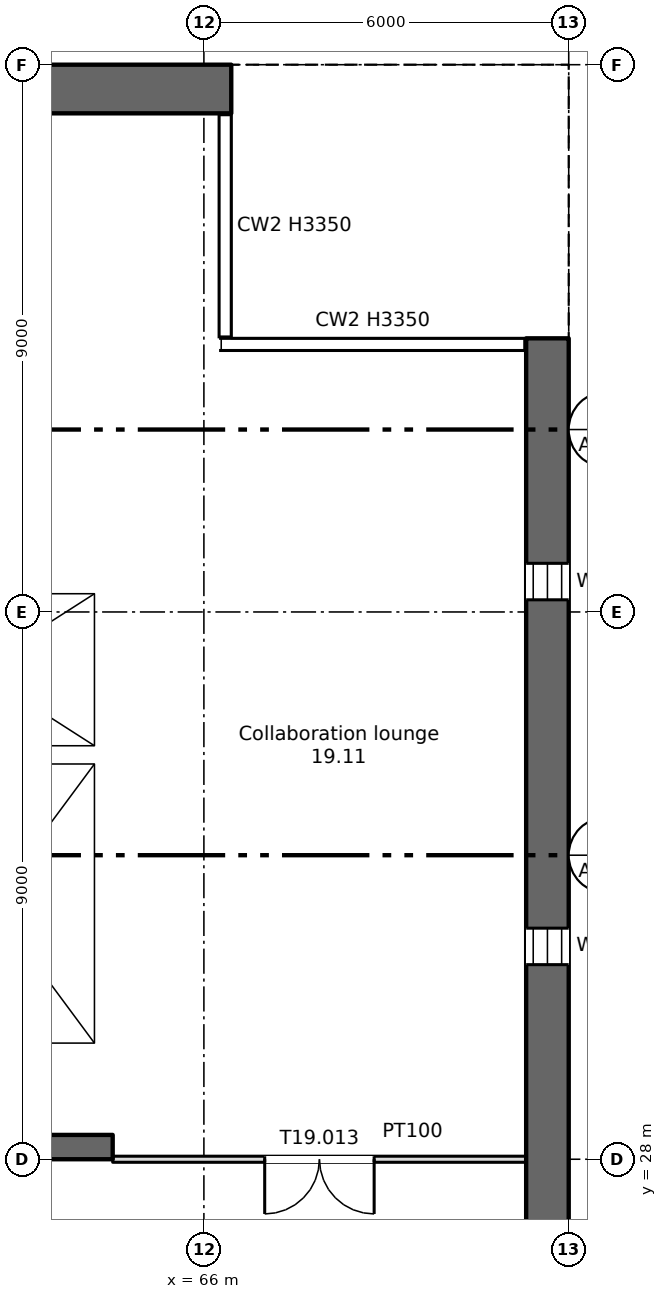
"""IFC4 building model, lengths in metres.
Left out: names, types, materials, properties, quantities, classifications, styles, units other than length and angle.
Written with IfcOpenShell. Run it as: python <this file> out.ifc"""

import sys

from ifc_helpers import new_model, si_unit, direction, frame, frame_2d, origin, place, context, subcontext, project, spatial, rectangle, extrude, element, fill, save


model = new_model("IFC4")
c1 = context("Model", 3, precision=1e-05, world=origin(), true_north=direction((0.0, 1.0)))
c2 = subcontext(c1, "Body", "Model", "MODEL_VIEW")
j1 = project(units=[si_unit("LENGTHUNIT", "METRE"), si_unit("PLANEANGLEUNIT", "RADIAN")], contexts=[c1])
p1 = place(None, origin())
s1 = spatial("IfcSite", under=j1, at=p1, CompositionType="ELEMENT")
p2 = place(p1, origin())
s2 = spatial("IfcBuilding", under=s1, at=p2, CompositionType="ELEMENT")
p3 = place(p2, frame((0.0, 0.0, 125.0)))
s3 = spatial("IfcBuildingStorey", under=s2, at=p3, CompositionType="ELEMENT", Elevation=125.0)
p4 = place(p3, frame((71.65, 6.0, 0.0), z_axis=(0.0, 0.0, 1.0), x_axis=(0.0, 1.0, 0.0)))
e1 = element("IfcWall", 1, at=p4, inside=s3, PredefinedType="SHEAR", context=c2, shape_type="SweptSolid", body=[
    extrude(rectangle(XDim=35.5, YDim=0.7, at=frame_2d((17.75, 0.0))), origin(), (0.0, 0.0, 1.0), 3.35),
])
p5 = place(p4, frame((1.2, 0.0, 0.6)))
e2 = element("IfcOpeningElement", 2, at=p5, cuts=e1, PredefinedType="OPENING", context=c2, shape_type="SweptSolid", body=[
    extrude(rectangle(XDim=0.6, YDim=2.4, at=frame_2d((0.3, 1.2))), frame((0.0, 0.36, 0.0), z_axis=(0.0, -1.0, 0.0), x_axis=(1.0, 0.0, 0.0)), (0.0, 0.0, 1.0), 0.72),
])
p6 = place(p4, frame((7.2, 0.0, 0.6)))
e3 = element("IfcOpeningElement", 3, at=p6, cuts=e1, PredefinedType="OPENING", context=c2, shape_type="SweptSolid", body=[
    extrude(rectangle(XDim=0.6, YDim=2.4, at=frame_2d((0.3, 1.2))), frame((0.0, 0.36, 0.0), z_axis=(0.0, -1.0, 0.0), x_axis=(1.0, 0.0, 0.0)), (0.0, 0.0, 1.0), 0.72),
])
p7 = place(p4, frame((13.2, 0.0, 0.6)))
e4 = element("IfcOpeningElement", 4, at=p7, cuts=e1, PredefinedType="OPENING", context=c2, shape_type="SweptSolid", body=[
    extrude(rectangle(XDim=0.6, YDim=2.4, at=frame_2d((0.3, 1.2))), frame((0.0, 0.36, 0.0), z_axis=(0.0, -1.0, 0.0), x_axis=(1.0, 0.0, 0.0)), (0.0, 0.0, 1.0), 0.72),
])
p8 = place(p4, frame((19.2, 0.0, 0.6)))
e5 = element("IfcOpeningElement", 5, at=p8, cuts=e1, PredefinedType="OPENING", context=c2, shape_type="SweptSolid", body=[
    extrude(rectangle(XDim=0.6, YDim=2.4, at=frame_2d((0.3, 1.2))), frame((0.0, 0.36, 0.0), z_axis=(0.0, -1.0, 0.0), x_axis=(1.0, 0.0, 0.0)), (0.0, 0.0, 1.0), 0.72),
])
p9 = place(p4, frame((25.2, 0.0, 0.6)))
e6 = element("IfcOpeningElement", 6, at=p9, cuts=e1, PredefinedType="OPENING", context=c2, shape_type="SweptSolid", body=[
    extrude(rectangle(XDim=0.6, YDim=2.4, at=frame_2d((0.3, 1.2))), frame((0.0, 0.36, 0.0), z_axis=(0.0, -1.0, 0.0), x_axis=(1.0, 0.0, 0.0)), (0.0, 0.0, 1.0), 0.72),
])
p10 = place(p4, frame((31.2, 0.0, 0.6)))
e7 = element("IfcOpeningElement", 7, at=p10, cuts=e1, PredefinedType="OPENING", context=c2, shape_type="SweptSolid", body=[
    extrude(rectangle(XDim=0.6, YDim=2.4, at=frame_2d((0.3, 1.2))), frame((0.0, 0.36, 0.0), z_axis=(0.0, -1.0, 0.0), x_axis=(1.0, 0.0, 0.0)), (0.0, 0.0, 1.0), 0.72),
])
p11 = place(p3, frame((5.55, 45.6, 0.0), z_axis=(0.0, 0.0, 1.0), x_axis=(1.0, 0.0, 0.0)))
e8 = element("IfcWall", 8, at=p11, inside=s3, PredefinedType="SHEAR", context=c2, shape_type="SweptSolid", body=[
    extrude(rectangle(XDim=60.9, YDim=0.8, at=frame_2d((30.45, 0.0))), origin(), (0.0, 0.0, 1.0), 3.35),
])
p12 = place(p11, frame((7.2, 0.0, 0.6)))
e9 = element("IfcOpeningElement", 9, at=p12, cuts=e8, PredefinedType="OPENING", context=c2, shape_type="SweptSolid", body=[
    extrude(rectangle(XDim=0.6, YDim=2.4, at=frame_2d((0.3, 1.2))), frame((0.0, 0.41, 0.0), z_axis=(0.0, -1.0, 0.0), x_axis=(1.0, 0.0, 0.0)), (0.0, 0.0, 1.0), 0.82),
])
p13 = place(p3, frame((6.7, 28.2, 0.0), z_axis=(0.0, 0.0, 1.0), x_axis=(1.0, 0.0, 0.0)))
e10 = element("IfcWall", 10, at=p13, inside=s3, PredefinedType="SHEAR", context=c2, shape_type="SweptSolid", body=[
    extrude(rectangle(XDim=57.8, YDim=0.4, at=frame_2d((28.9, 0.0))), origin(), (0.0, 0.0, 1.0), 3.35),
])
p14 = place(p13, frame((12.062, 0.0, 0.0)))
e11 = element("IfcOpeningElement", 11, at=p14, cuts=e10, PredefinedType="OPENING", context=c2, shape_type="SweptSolid", body=[
    extrude(rectangle(XDim=0.9, YDim=2.1, at=frame_2d((0.45, 1.05))), frame((0.0, 0.21, 0.0), z_axis=(0.0, -1.0, 0.0), x_axis=(1.0, 0.0, 0.0)), (0.0, 0.0, 1.0), 0.42),
])
p15 = place(p13, frame((14.637, 0.0, 0.0)))
e12 = element("IfcOpeningElement", 12, at=p15, cuts=e10, PredefinedType="OPENING", context=c2, shape_type="SweptSolid", body=[
    extrude(rectangle(XDim=0.9, YDim=2.1, at=frame_2d((0.45, 1.05))), frame((0.0, 0.21, 0.0), z_axis=(0.0, -1.0, 0.0), x_axis=(1.0, 0.0, 0.0)), (0.0, 0.0, 1.0), 0.42),
])
p16 = place(p13, frame((49.062, 0.0, 0.0)))
e13 = element("IfcOpeningElement", 13, at=p16, cuts=e10, PredefinedType="OPENING", context=c2, shape_type="SweptSolid", body=[
    extrude(rectangle(XDim=0.9, YDim=2.1, at=frame_2d((0.45, 1.05))), frame((0.0, 0.21, 0.0), z_axis=(0.0, -1.0, 0.0), x_axis=(1.0, 0.0, 0.0)), (0.0, 0.0, 1.0), 0.42),
])
p17 = place(p13, frame((51.637, 0.0, 0.0)))
e14 = element("IfcOpeningElement", 14, at=p17, cuts=e10, PredefinedType="OPENING", context=c2, shape_type="SweptSolid", body=[
    extrude(rectangle(XDim=0.9, YDim=2.1, at=frame_2d((0.45, 1.05))), frame((0.0, 0.21, 0.0), z_axis=(0.0, -1.0, 0.0), x_axis=(1.0, 0.0, 0.0)), (0.0, 0.0, 1.0), 0.42),
])
p18 = place(p13, frame((1.35, 0.0, 0.0)))
e15 = element("IfcOpeningElement", 15, at=p18, cuts=e10, PredefinedType="OPENING", context=c2, shape_type="SweptSolid", body=[
    extrude(rectangle(XDim=0.9, YDim=2.1, at=frame_2d((0.45, 1.05))), frame((0.0, 0.21, 0.0), z_axis=(0.0, -1.0, 0.0), x_axis=(1.0, 0.0, 0.0)), (0.0, 0.0, 1.0), 0.42),
])
p19 = place(p13, frame((4.7, 0.0, 0.0)))
e16 = element("IfcOpeningElement", 16, at=p19, cuts=e10, PredefinedType="OPENING", context=c2, shape_type="SweptSolid", body=[
    extrude(rectangle(XDim=1.2, YDim=2.1, at=frame_2d((0.6, 1.05))), frame((0.0, 0.21, 0.0), z_axis=(0.0, -1.0, 0.0), x_axis=(1.0, 0.0, 0.0)), (0.0, 0.0, 1.0), 0.42),
])
p20 = place(p13, frame((31.7, 0.0, 0.0)))
e17 = element("IfcOpeningElement", 17, at=p20, cuts=e10, PredefinedType="OPENING", context=c2, shape_type="SweptSolid", body=[
    extrude(rectangle(XDim=1.2, YDim=2.1, at=frame_2d((0.6, 1.05))), frame((0.0, 0.21, 0.0), z_axis=(0.0, -1.0, 0.0), x_axis=(1.0, 0.0, 0.0)), (0.0, 0.0, 1.0), 0.42),
])
p21 = place(p13, frame((55.2, 0.0, 0.0)))
e18 = element("IfcOpeningElement", 18, at=p21, cuts=e10, PredefinedType="OPENING", context=c2, shape_type="SweptSolid", body=[
    extrude(rectangle(XDim=1.2, YDim=2.1, at=frame_2d((0.6, 1.05))), frame((0.0, 0.21, 0.0), z_axis=(0.0, -1.0, 0.0), x_axis=(1.0, 0.0, 0.0)), (0.0, 0.0, 1.0), 0.42),
])
p22 = place(p13, frame((21.7, 0.0, 0.0)))
e19 = element("IfcOpeningElement", 19, at=p22, cuts=e10, PredefinedType="OPENING", context=c2, shape_type="SweptSolid", body=[
    extrude(rectangle(XDim=1.2, YDim=2.1, at=frame_2d((0.6, 1.05))), frame((0.0, 0.21, 0.0), z_axis=(0.0, -1.0, 0.0), x_axis=(1.0, 0.0, 0.0)), (0.0, 0.0, 1.0), 0.42),
])
p23 = place(p13, frame((41.7, 0.0, 0.0)))
e20 = element("IfcOpeningElement", 20, at=p23, cuts=e10, PredefinedType="OPENING", context=c2, shape_type="SweptSolid", body=[
    extrude(rectangle(XDim=1.2, YDim=2.1, at=frame_2d((0.6, 1.05))), frame((0.0, 0.21, 0.0), z_axis=(0.0, -1.0, 0.0), x_axis=(1.0, 0.0, 0.0)), (0.0, 0.0, 1.0), 0.42),
])
p24 = place(p13, frame((24.85, 0.0, 0.0)))
e21 = element("IfcOpeningElement", 21, at=p24, cuts=e10, PredefinedType="OPENING", context=c2, shape_type="SweptSolid", body=[
    extrude(rectangle(XDim=2.4, YDim=2.1, at=frame_2d((1.2, 1.05))), frame((0.0, 0.21, 0.0), z_axis=(0.0, -1.0, 0.0), x_axis=(1.0, 0.0, 0.0)), (0.0, 0.0, 1.0), 0.42),
])
p25 = place(p13, frame((37.35, 0.0, 0.0)))
e22 = element("IfcOpeningElement", 22, at=p25, cuts=e10, PredefinedType="OPENING", context=c2, shape_type="SweptSolid", body=[
    extrude(rectangle(XDim=2.4, YDim=2.1, at=frame_2d((1.2, 1.05))), frame((0.0, 0.21, 0.0), z_axis=(0.0, -1.0, 0.0), x_axis=(1.0, 0.0, 0.0)), (0.0, 0.0, 1.0), 0.42),
])
p26 = place(p13, frame((7.95, 0.0, 0.0)))
e23 = element("IfcOpeningElement", 23, at=p26, cuts=e10, PredefinedType="OPENING", context=c2, shape_type="SweptSolid", body=[
    extrude(rectangle(XDim=2.4, YDim=2.1, at=frame_2d((1.2, 1.05))), frame((0.0, 0.21, 0.0), z_axis=(0.0, -1.0, 0.0), x_axis=(1.0, 0.0, 0.0)), (0.0, 0.0, 1.0), 0.42),
])
p27 = place(p13, frame((28.85, 0.0, 0.0)))
e24 = element("IfcOpeningElement", 24, at=p27, cuts=e10, PredefinedType="OPENING", context=c2, shape_type="SweptSolid", body=[
    extrude(rectangle(XDim=0.9, YDim=2.1, at=frame_2d((0.45, 1.05))), frame((0.0, 0.21, 0.0), z_axis=(0.0, -1.0, 0.0), x_axis=(1.0, 0.0, 0.0)), (0.0, 0.0, 1.0), 0.42),
])
p28 = place(p13, frame((34.85, 0.0, 0.0)))
e25 = element("IfcOpeningElement", 25, at=p28, cuts=e10, PredefinedType="OPENING", context=c2, shape_type="SweptSolid", body=[
    extrude(rectangle(XDim=0.9, YDim=2.1, at=frame_2d((0.45, 1.05))), frame((0.0, 0.21, 0.0), z_axis=(0.0, -1.0, 0.0), x_axis=(1.0, 0.0, 0.0)), (0.0, 0.0, 1.0), 0.42),
])
p29 = place(p3, frame((64.35, 34.8, 0.0), z_axis=(0.0, 0.0, 1.0), x_axis=(0.0, 1.0, 0.0)))
e26 = element("IfcWall", 26, at=p29, inside=s3, PredefinedType="SHEAR", context=c2, shape_type="SweptSolid", body=[
    extrude(rectangle(XDim=10.4, YDim=0.3, at=frame_2d((5.2, 0.0))), origin(), (0.0, 0.0, 1.0), 3.35),
])
p30 = place(p3, frame((64.35, 28.4, 0.0), z_axis=(0.0, 0.0, 1.0), x_axis=(0.0, 1.0, 0.0)))
e27 = element("IfcWall", 27, at=p30, inside=s3, PredefinedType="SHEAR", context=c2, shape_type="SweptSolid", body=[
    extrude(rectangle(XDim=6.1, YDim=0.3, at=frame_2d((3.05, 0.0))), origin(), (0.0, 0.0, 1.0), 3.35),
])
p31 = place(p3, frame((60.3, 34.65, 0.0), z_axis=(0.0, 0.0, 1.0), x_axis=(1.0, 0.0, 0.0)))
e28 = element("IfcWall", 28, at=p31, inside=s3, PredefinedType="SHEAR", context=c2, shape_type="SweptSolid", body=[
    extrude(rectangle(XDim=4.2, YDim=0.3, at=frame_2d((2.1, 0.0))), origin(), (0.0, 0.0, 1.0), 3.35),
])
p32 = place(p3, frame((60.3, 37.45, 0.0), z_axis=(0.0, 0.0, 1.0), x_axis=(1.0, 0.0, 0.0)))
e29 = element("IfcWall", 29, at=p32, inside=s3, PredefinedType="SHEAR", context=c2, shape_type="SweptSolid", body=[
    extrude(rectangle(XDim=3.9, YDim=0.3, at=frame_2d((1.95, 0.0))), origin(), (0.0, 0.0, 1.0), 3.35),
])
p33 = place(p32, frame((1.4, 0.0, 0.0)))
e30 = element("IfcOpeningElement", 30, at=p33, cuts=e29, PredefinedType="OPENING", context=c2, shape_type="SweptSolid", body=[
    extrude(rectangle(XDim=1.1, YDim=2.1, at=frame_2d((0.55, 1.05))), frame((0.0, 0.16, 0.0), z_axis=(0.0, -1.0, 0.0), x_axis=(1.0, 0.0, 0.0)), (0.0, 0.0, 1.0), 0.32),
])
p34 = place(p3, frame((64.5, 28.0, 0.0), z_axis=(0.0, 0.0, 1.0), x_axis=(1.0, 0.0, 0.0)))
e31 = element("IfcWall", 31, at=p34, inside=s3, PredefinedType="PARTITIONING", context=c2, shape_type="SweptSolid", body=[
    extrude(rectangle(XDim=6.8, YDim=0.1, at=frame_2d((3.4, 0.0))), origin(), (0.0, 0.0, 1.0), 3.35),
])
p35 = place(p34, frame((2.5, 0.0, 0.0)))
e32 = element("IfcOpeningElement", 32, at=p35, cuts=e31, PredefinedType="OPENING", context=c2, shape_type="SweptSolid", body=[
    extrude(rectangle(XDim=1.8, YDim=2.1, at=frame_2d((0.9, 1.05))), frame((0.0, 0.06, 0.0), z_axis=(0.0, -1.0, 0.0), x_axis=(1.0, 0.0, 0.0)), (0.0, 0.0, 1.0), 0.12),
])
p36 = place(p9, origin())
e33 = element("IfcWindow", 33, at=p36, inside=s3, PartitioningType="SINGLE_PANEL", PredefinedType="WINDOW", context=c2, shape_type="SweptSolid", body=[
    extrude(rectangle(XDim=0.6, YDim=2.4, at=frame_2d((0.3, 1.2))), frame((0.0, 0.03, 0.0), z_axis=(0.0, -1.0, 0.0), x_axis=(1.0, 0.0, 0.0)), (0.0, 0.0, 1.0), 0.06),
])
fill(e6, e33)
p37 = place(p10, origin())
e34 = element("IfcWindow", 34, at=p37, inside=s3, PartitioningType="SINGLE_PANEL", PredefinedType="WINDOW", context=c2, shape_type="SweptSolid", body=[
    extrude(rectangle(XDim=0.6, YDim=2.4, at=frame_2d((0.3, 1.2))), frame((0.0, 0.03, 0.0), z_axis=(0.0, -1.0, 0.0), x_axis=(1.0, 0.0, 0.0)), (0.0, 0.0, 1.0), 0.06),
])
fill(e7, e34)
p38 = place(p35, origin())
e35 = element("IfcDoor", 35, at=p38, inside=s3, OperationType="DOUBLE_DOOR_SINGLE_SWING", PredefinedType="DOOR", context=c2, shape_type="SweptSolid", body=[
    extrude(rectangle(XDim=1.8, YDim=2.1, at=frame_2d((0.9, 1.05))), frame((0.0, 0.025, 0.0), z_axis=(0.0, -1.0, 0.0), x_axis=(1.0, 0.0, 0.0)), (0.0, 0.0, 1.0), 0.05),
])
fill(e32, e35)
save(model, sys.argv[1])
